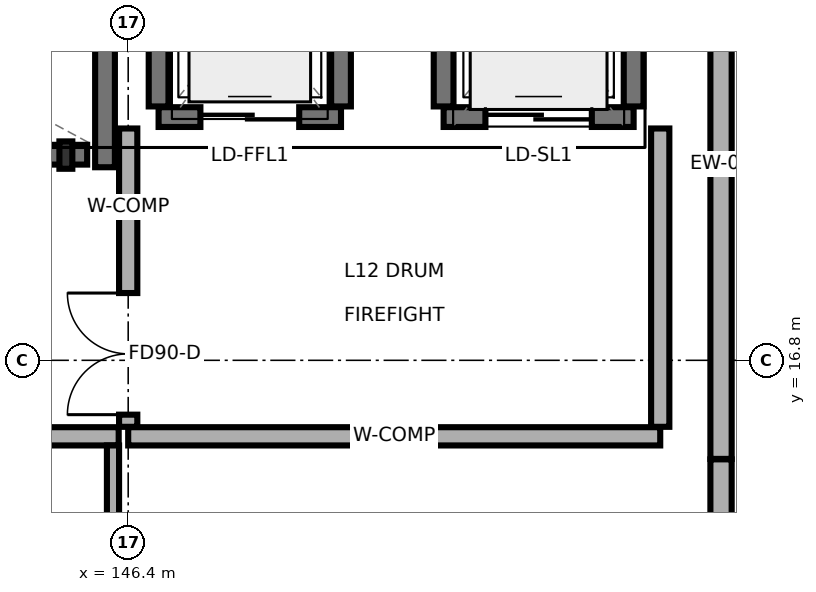
"""IFC4 building model, lengths in metres.
Left out: names, types, materials, properties, quantities, classifications, styles, units other than length and angle.
Written with IfcOpenShell. Run it as: python <this file> out.ifc"""

import sys

from ifc_helpers import new_model, si_unit, direction, frame, frame_2d, origin, origin_2d, place, context, subcontext, project, spatial, rectangle, i_section, extrude, element, fill, save


model = new_model("IFC4")
c1 = context("Model", 3, precision=1e-05, world=origin(), true_north=direction((0.0, 1.0)))
c2 = subcontext(c1, "Body", "Model", "MODEL_VIEW")
j1 = project(units=[si_unit("LENGTHUNIT", "METRE"), si_unit("PLANEANGLEUNIT", "RADIAN")], contexts=[c1])
p1 = place(None, origin())
s1 = spatial("IfcSite", under=j1, at=p1, CompositionType="ELEMENT")
p2 = place(p1, origin())
s2 = spatial("IfcBuilding", under=s1, at=p2, CompositionType="ELEMENT")
p3 = place(p2, frame((0.0, 0.0, 41.9)))
s3 = spatial("IfcBuildingStorey", under=s2, at=p3, CompositionType="ELEMENT", Elevation=41.9)
p4 = place(p3, frame((145.58, 19.5, 0.0), z_axis=(0.0, 0.0, 1.0), x_axis=(1.0, 0.0, 0.0)))
e1 = element("IfcColumn", 1, at=p4, inside=s3, PredefinedType="PILASTER", context=c2, shape_type="SweptSolid", body=[
    extrude(i_section(OverallWidth=0.17, OverallDepth=0.36, WebThickness=0.008, FlangeThickness=0.013, FilletRadius=0.018, at=origin_2d()), origin(), (0.0, 0.0, 1.0), 4.2),
])
p5 = place(p3, frame((154.2, 10.5, 0.0), z_axis=(0.0, 0.0, 1.0), x_axis=(0.0, 1.0, 0.0)))
e2 = element("IfcWall", 2, at=p5, inside=s3, PredefinedType="SOLIDWALL", context=c2, shape_type="SweptSolid", body=[
    extrude(rectangle(XDim=4.997, YDim=0.28, at=frame_2d((2.499, 0.0))), origin(), (0.0, 0.0, 1.0), 3.995),
])
p6 = place(p5, frame((1.698, 0.0, 0.0)))
e3 = element("IfcOpeningElement", 3, at=p6, cuts=e2, PredefinedType="OPENING", context=c2, shape_type="SweptSolid", body=[
    extrude(rectangle(XDim=1.6, YDim=2.2, at=frame_2d((0.8, 1.1))), frame((0.0, 0.15, 0.0), z_axis=(0.0, -1.0, 0.0), x_axis=(1.0, 0.0, 0.0)), (0.0, 0.0, 1.0), 0.3),
])
p7 = place(p3, frame((154.2, 15.503, 0.0), z_axis=(0.0, 0.0, 1.0), x_axis=(0.0, 1.0, 0.0)))
e4 = element("IfcWall", 4, at=p7, inside=s3, PredefinedType="SOLIDWALL", context=c2, shape_type="SweptSolid", body=[
    extrude(rectangle(XDim=7.752, YDim=0.28, at=frame_2d((3.876, 0.0))), origin(), (0.0, 0.0, 1.0), 3.53),
])
p8 = place(p3, frame((146.095, 19.34, 0.0), z_axis=(0.0, 0.0, 1.0), x_axis=(0.0, 1.0, 0.0)))
e5 = element("IfcWall", 5, at=p8, inside=s3, PredefinedType="SHEAR", context=c2, shape_type="SweptSolid", body=[
    extrude(rectangle(XDim=4.27, YDim=0.26, at=frame_2d((2.135, 0.0))), origin(), (0.0, 0.0, 1.0), 3.995),
])
p9 = place(p3, frame((137.34, 19.505, 0.0), z_axis=(0.0, 0.0, 1.0), x_axis=(1.0, 0.0, 0.0)))
e6 = element("IfcWall", 6, at=p9, inside=s3, PredefinedType="SHEAR", context=c2, shape_type="SweptSolid", body=[
    extrude(rectangle(XDim=8.52, YDim=0.26, at=frame_2d((4.26, 0.0))), origin(), (0.0, 0.0, 1.0), 3.995),
])
p10 = place(p3, frame((146.8, 20.0, 0.0), z_axis=(0.0, 0.0, 1.0), x_axis=(1.0, 0.0, 0.0)))
e7 = element("IfcWall", 7, at=p10, inside=s3, PredefinedType="SHEAR", context=c2, shape_type="SweptSolid", body=[
    extrude(rectangle(XDim=2.4, YDim=0.26, at=frame_2d((1.2, 0.0))), origin(), (0.0, 0.0, 1.0), 3.995),
])
p11 = place(p10, frame((0.55, 0.0, 0.0)))
e8 = element("IfcOpeningElement", 8, at=p11, cuts=e7, PredefinedType="OPENING", context=c2, shape_type="SweptSolid", body=[
    extrude(rectangle(XDim=1.3, YDim=2.25, at=frame_2d((0.65, 1.125))), frame((0.0, 0.14, 0.0), z_axis=(0.0, -1.0, 0.0), x_axis=(1.0, 0.0, 0.0)), (0.0, 0.0, 1.0), 0.28),
])
for number, where, z_axis, x_axis in (
    (9, (146.8, 20.14, 0.0), (0.0, 0.0, 1.0), (0.0, 1.0, 0.0)),
    (10, (149.2, 20.14, 0.0), (0.0, 0.0, 1.0), (0.0, 1.0, 0.0)),
):
    element("IfcWall", number, at=place(p3, frame(where, z_axis=z_axis, x_axis=x_axis)), inside=s3, PredefinedType="SHEAR", context=c2, shape_type="SweptSolid", body=[
        extrude(rectangle(XDim=2.52, YDim=0.26, at=frame_2d((1.26, 0.0))), origin(), (0.0, 0.0, 1.0), 3.995),
    ])
p12 = place(p3, frame((150.55, 20.0, 0.0), z_axis=(0.0, 0.0, 1.0), x_axis=(1.0, 0.0, 0.0)))
e11 = element("IfcWall", 11, at=p12, inside=s3, PredefinedType="SHEAR", context=c2, shape_type="SweptSolid", body=[
    extrude(rectangle(XDim=2.5, YDim=0.26, at=frame_2d((1.25, 0.0))), origin(), (0.0, 0.0, 1.0), 3.995),
])
p13 = place(p12, frame((0.55, 0.0, 0.0)))
e12 = element("IfcOpeningElement", 12, at=p13, cuts=e11, PredefinedType="OPENING", context=c2, shape_type="SweptSolid", body=[
    extrude(rectangle(XDim=1.4, YDim=2.3, at=frame_2d((0.7, 1.15))), frame((0.0, 0.14, 0.0), z_axis=(0.0, -1.0, 0.0), x_axis=(1.0, 0.0, 0.0)), (0.0, 0.0, 1.0), 0.28),
])
for number, where, z_axis, x_axis in (
    (13, (150.55, 20.14, 0.0), (0.0, 0.0, 1.0), (0.0, 1.0, 0.0)),
    (14, (153.05, 20.14, 0.0), (0.0, 0.0, 1.0), (0.0, 1.0, 0.0)),
):
    element("IfcWall", number, at=place(p3, frame(where, z_axis=z_axis, x_axis=x_axis)), inside=s3, PredefinedType="SHEAR", context=c2, shape_type="SweptSolid", body=[
        extrude(rectangle(XDim=2.52, YDim=0.26, at=frame_2d((1.26, 0.0))), origin(), (0.0, 0.0, 1.0), 3.995),
    ])
p14 = place(p3, frame((146.4, 15.8, 0.0), z_axis=(0.0, 0.0, 1.0), x_axis=(1.0, 0.0, 0.0)))
e15 = element("IfcWall", 15, at=p14, inside=s3, PredefinedType="SOLIDWALL", context=c2, shape_type="SweptSolid", body=[
    extrude(rectangle(XDim=7.0, YDim=0.24, at=frame_2d((3.5, 0.0))), origin(), (0.0, 0.0, 1.0), 3.58),
])
p15 = place(p3, frame((146.4, 15.925, 0.0), z_axis=(0.0, 0.0, 1.0), x_axis=(0.0, 1.0, 0.0)))
e16 = element("IfcWall", 16, at=p15, inside=s3, PredefinedType="SOLIDWALL", context=c2, shape_type="SweptSolid", body=[
    extrude(rectangle(XDim=3.925, YDim=0.24, at=frame_2d((1.962, 0.0))), origin(), (0.0, 0.0, 1.0), 3.53),
])
p16 = place(p15, frame((0.16, 0.0, 0.0)))
e17 = element("IfcOpeningElement", 17, at=p16, cuts=e16, PredefinedType="OPENING", context=c2, shape_type="SweptSolid", body=[
    extrude(rectangle(XDim=1.6, YDim=2.2, at=frame_2d((0.8, 1.1))), frame((0.0, 0.13, 0.0), z_axis=(0.0, -1.0, 0.0), x_axis=(1.0, 0.0, 0.0)), (0.0, 0.0, 1.0), 0.26),
])
p17 = place(p3, frame((153.4, 15.925, 0.0), z_axis=(0.0, 0.0, 1.0), x_axis=(0.0, 1.0, 0.0)))
e18 = element("IfcWall", 18, at=p17, inside=s3, PredefinedType="SOLIDWALL", context=c2, shape_type="SweptSolid", body=[
    extrude(rectangle(XDim=3.925, YDim=0.24, at=frame_2d((1.962, 0.0))), origin(), (0.0, 0.0, 1.0), 3.53),
])
p18 = place(p3, frame((134.6, 15.8, 0.0), z_axis=(0.0, 0.0, 1.0), x_axis=(1.0, 0.0, 0.0)))
e19 = element("IfcWall", 19, at=p18, inside=s3, PredefinedType="SOLIDWALL", context=c2, shape_type="SweptSolid", body=[
    extrude(rectangle(XDim=11.675, YDim=0.24, at=frame_2d((5.837, 0.0))), origin(), (0.0, 0.0, 1.0), 3.58),
])
p19 = place(p18, frame((4.938, 0.0, 0.0)))
e20 = element("IfcOpeningElement", 20, at=p19, cuts=e19, PredefinedType="OPENING", context=c2, shape_type="SweptSolid", body=[
    extrude(rectangle(XDim=1.8, YDim=2.3, at=frame_2d((0.9, 1.15))), frame((0.0, 0.13, 0.0), z_axis=(0.0, -1.0, 0.0), x_axis=(1.0, 0.0, 0.0)), (0.0, 0.0, 1.0), 0.26),
])
p20 = place(p3, frame((146.2, 8.359, 0.0), z_axis=(0.0, 0.0, 1.0), x_axis=(0.0, 1.0, 0.0)))
e21 = element("IfcWall", 21, at=p20, inside=s3, PredefinedType="PARTITIONING", context=c2, shape_type="SweptSolid", body=[
    extrude(rectangle(XDim=7.321, YDim=0.16, at=frame_2d((3.661, 0.0))), origin(), (0.0, 0.0, 1.0), 3.54),
])
p21 = place(p20, frame((2.76, 0.0, 0.0)))
e22 = element("IfcOpeningElement", 22, at=p21, cuts=e21, PredefinedType="OPENING", context=c2, shape_type="SweptSolid", body=[
    extrude(rectangle(XDim=1.8, YDim=2.3, at=frame_2d((0.9, 1.15))), frame((0.0, 0.09, 0.0), z_axis=(0.0, -1.0, 0.0), x_axis=(1.0, 0.0, 0.0)), (0.0, 0.0, 1.0), 0.18),
])
p22 = place(p11, origin())
e23 = element("IfcDoor", 23, at=p22, inside=s3, OperationType="SLIDING_TO_RIGHT", PredefinedType="DOOR", context=c2, shape_type="SweptSolid", body=[
    extrude(rectangle(XDim=1.3, YDim=2.25, at=frame_2d((0.65, 1.125))), frame((0.0, 0.025, 0.0), z_axis=(0.0, -1.0, 0.0), x_axis=(1.0, 0.0, 0.0)), (0.0, 0.0, 1.0), 0.05),
])
fill(e8, e23)
p23 = place(p13, origin())
e24 = element("IfcDoor", 24, at=p23, inside=s3, OperationType="SLIDING_TO_LEFT", PredefinedType="DOOR", context=c2, shape_type="SweptSolid", body=[
    extrude(rectangle(XDim=1.4, YDim=2.3, at=frame_2d((0.7, 1.15))), frame((0.0, 0.025, 0.0), z_axis=(0.0, -1.0, 0.0), x_axis=(1.0, 0.0, 0.0)), (0.0, 0.0, 1.0), 0.05),
])
fill(e12, e24)
p24 = place(p16, origin())
e25 = element("IfcDoor", 25, at=p24, inside=s3, OperationType="DOUBLE_DOOR_SINGLE_SWING", PredefinedType="DOOR", context=c2, shape_type="SweptSolid", body=[
    extrude(rectangle(XDim=1.6, YDim=2.2, at=frame_2d((0.8, 1.1))), frame((0.0, 0.025, 0.0), z_axis=(0.0, -1.0, 0.0), x_axis=(1.0, 0.0, 0.0)), (0.0, 0.0, 1.0), 0.05),
])
fill(e17, e25)
save(model, sys.argv[1])
